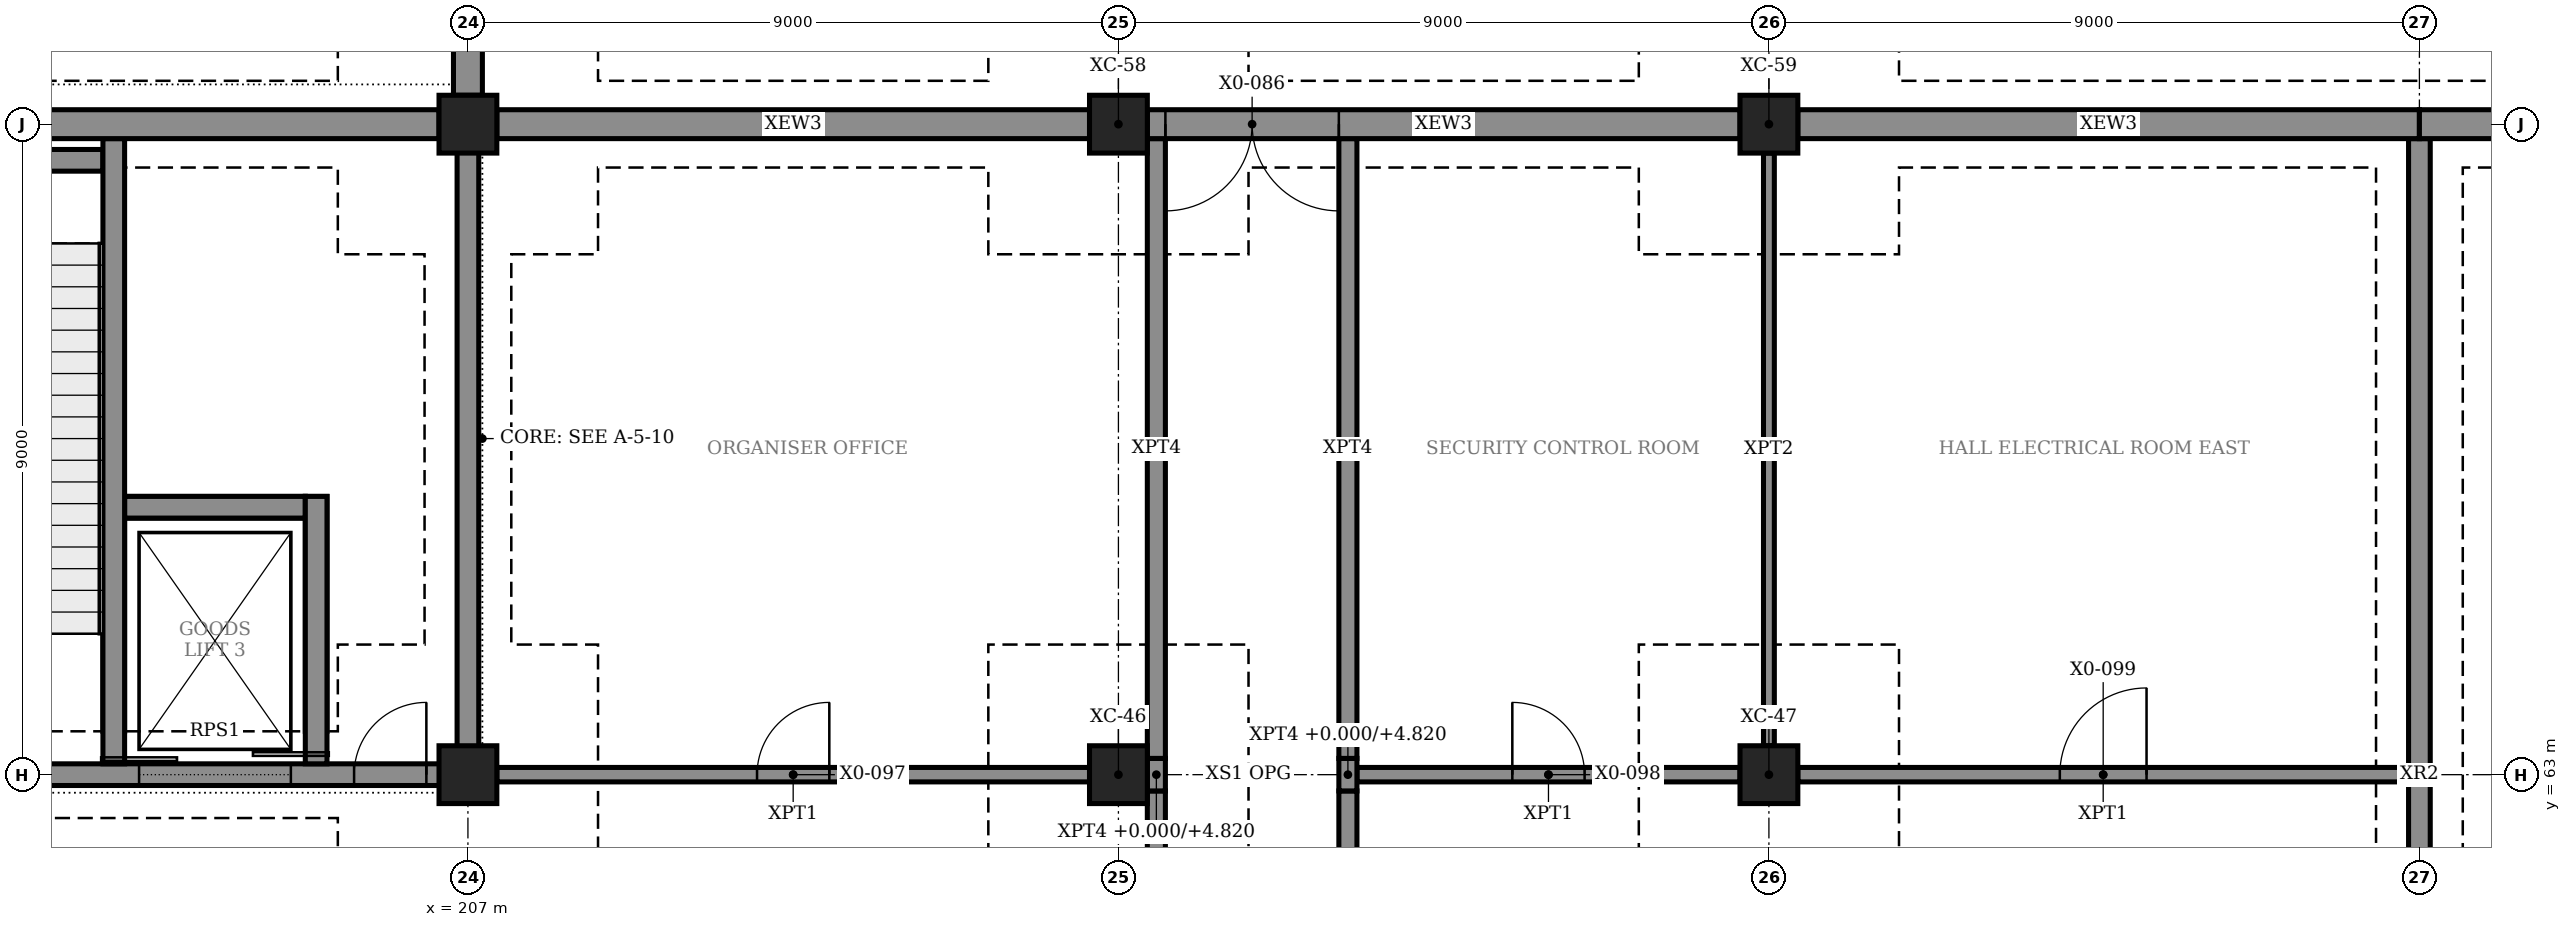
"""IFC4 building model, lengths in metres.
Left out: names, types, materials, properties, quantities, classifications, styles, units other than length and angle.
Written with IfcOpenShell. Run it as: python <this file> out.ifc"""

import sys

from ifc_helpers import new_model, si_unit, direction, frame, frame_2d, origin, origin_2d, place, context, subcontext, project, spatial, rectangle, extrude, element, fill, save


model = new_model("IFC4")
c1 = context("Model", 3, precision=1e-05, world=origin(), true_north=direction((0.0, 1.0)))
c2 = subcontext(c1, "Body", "Model", "MODEL_VIEW")
j1 = project(units=[si_unit("LENGTHUNIT", "METRE"), si_unit("PLANEANGLEUNIT", "RADIAN")], contexts=[c1])
p1 = place(None, origin())
s1 = spatial("IfcSite", under=j1, at=p1, CompositionType="ELEMENT")
p2 = place(p1, origin())
s2 = spatial("IfcBuilding", under=s1, at=p2, CompositionType="ELEMENT")
p3 = place(p2, origin())
s3 = spatial("IfcBuildingStorey", under=s2, at=p3, CompositionType="ELEMENT", Elevation=0.0)
for number, where, z_axis, x_axis in (
    (1, (207.0, 63.0, 0.0), (0.0, 0.0, 1.0), (1.0, 0.0, 0.0)),
    (2, (216.0, 63.0, 0.0), (0.0, 0.0, 1.0), (1.0, 0.0, 0.0)),
    (3, (225.0, 63.0, 0.0), (0.0, 0.0, 1.0), (1.0, 0.0, 0.0)),
    (4, (207.0, 72.0, 0.0), (0.0, 0.0, 1.0), (1.0, 0.0, 0.0)),
    (5, (216.0, 72.0, 0.0), (0.0, 0.0, 1.0), (1.0, 0.0, 0.0)),
    (6, (225.0, 72.0, 0.0), (0.0, 0.0, 1.0), (1.0, 0.0, 0.0)),
):
    element("IfcColumn", number, at=place(p3, frame(where, z_axis=z_axis, x_axis=x_axis)), inside=s3, PredefinedType="COLUMN", context=c2, shape_type="SweptSolid", body=[
        extrude(rectangle(XDim=0.8, YDim=0.8, at=origin_2d()), origin(), (0.0, 0.0, 1.0), 6.0),
    ])
p4 = place(p3, frame((197.85, 63.0, 0.0), z_axis=(0.0, 0.0, 1.0), x_axis=(1.0, 0.0, 0.0)))
e7 = element("IfcWall", 7, at=p4, inside=s3, PredefinedType="SHEAR", context=c2, shape_type="SweptSolid", body=[
    extrude(rectangle(XDim=9.3, YDim=0.3, at=frame_2d((4.65, 0.0))), origin(), (0.0, 0.0, 1.0), 6.0),
])
p5 = place(p4, frame((1.325, 0.0, 0.0)))
e8 = element("IfcOpeningElement", 8, at=p5, cuts=e7, PredefinedType="OPENING", context=c2, shape_type="SweptSolid", body=[
    extrude(rectangle(XDim=1.8, YDim=2.4, at=frame_2d((0.9, 1.2))), frame((0.0, 0.16, 0.0), z_axis=(0.0, -1.0, 0.0), x_axis=(1.0, 0.0, 0.0)), (0.0, 0.0, 1.0), 0.32),
])
p6 = place(p4, frame((4.6, 0.0, 0.0)))
e9 = element("IfcOpeningElement", 9, at=p6, cuts=e7, PredefinedType="OPENING", context=c2, shape_type="SweptSolid", body=[
    extrude(rectangle(XDim=2.1, YDim=2.4, at=frame_2d((1.05, 1.2))), frame((0.0, 0.16, 0.0), z_axis=(0.0, -1.0, 0.0), x_axis=(1.0, 0.0, 0.0)), (0.0, 0.0, 1.0), 0.32),
])
p7 = place(p4, frame((7.575, 0.0, 0.0)))
e10 = element("IfcOpeningElement", 10, at=p7, cuts=e7, PredefinedType="OPENING", context=c2, shape_type="SweptSolid", body=[
    extrude(rectangle(XDim=1.0, YDim=2.4, at=frame_2d((0.5, 1.2))), frame((0.0, 0.16, 0.0), z_axis=(0.0, -1.0, 0.0), x_axis=(1.0, 0.0, 0.0)), (0.0, 0.0, 1.0), 0.32),
])
p8 = place(p3, frame((207.0, 63.15, 0.0), z_axis=(0.0, 0.0, 1.0), x_axis=(0.0, 1.0, 0.0)))
e11 = element("IfcWall", 11, at=p8, inside=s3, PredefinedType="SHEAR", context=c2, shape_type="SweptSolid", body=[
    extrude(rectangle(XDim=8.65, YDim=0.3, at=frame_2d((4.325, 0.0))), origin(), (0.0, 0.0, 1.0), 6.0),
])
p9 = place(p3, frame((234.0, 54.2, 0.0), z_axis=(0.0, 0.0, 1.0), x_axis=(0.0, 1.0, 0.0)))
e12 = element("IfcWall", 12, at=p9, inside=s3, PredefinedType="SOLIDWALL", context=c2, shape_type="SweptSolid", body=[
    extrude(rectangle(XDim=17.6, YDim=0.3, at=frame_2d((8.8, 0.0))), origin(), (0.0, 0.0, 1.0), 5.72),
])
for number, where, z_axis, x_axis in (
    (13, (198.4, 72.0, 0.0), (0.0, 0.0, 1.0), (1.0, 0.0, 0.0)),
    (14, (207.4, 72.0, 0.0), (0.0, 0.0, 1.0), (1.0, 0.0, 0.0)),
):
    element("IfcWall", number, at=place(p3, frame(where, z_axis=z_axis, x_axis=x_axis)), inside=s3, PredefinedType="SOLIDWALL", context=c2, shape_type="SweptSolid", body=[
        extrude(rectangle(XDim=8.2, YDim=0.4, at=frame_2d((4.1, 0.0))), origin(), (0.0, 0.0, 1.0), 4.82),
    ])
p10 = place(p3, frame((216.4, 72.0, 0.0), z_axis=(0.0, 0.0, 1.0), x_axis=(1.0, 0.0, 0.0)))
e15 = element("IfcWall", 15, at=p10, inside=s3, PredefinedType="SOLIDWALL", context=c2, shape_type="SweptSolid", body=[
    extrude(rectangle(XDim=8.2, YDim=0.4, at=frame_2d((4.1, 0.0))), origin(), (0.0, 0.0, 1.0), 4.82),
])
p11 = place(p10, frame((0.25, 0.0, 0.0)))
e16 = element("IfcOpeningElement", 16, at=p11, cuts=e15, PredefinedType="OPENING", context=c2, shape_type="SweptSolid", body=[
    extrude(rectangle(XDim=2.4, YDim=2.4, at=frame_2d((1.2, 1.2))), frame((0.0, 0.21, 0.0), z_axis=(0.0, -1.0, 0.0), x_axis=(1.0, 0.0, 0.0)), (0.0, 0.0, 1.0), 0.42),
])
p12 = place(p3, frame((225.4, 72.0, 0.0), z_axis=(0.0, 0.0, 1.0), x_axis=(1.0, 0.0, 0.0)))
e17 = element("IfcWall", 17, at=p12, inside=s3, PredefinedType="SOLIDWALL", context=c2, shape_type="SweptSolid", body=[
    extrude(rectangle(XDim=8.6, YDim=0.4, at=frame_2d((4.3, 0.0))), origin(), (0.0, 0.0, 1.0), 4.82),
])
p13 = place(p3, frame((234.0, 72.0, 0.0), z_axis=(0.0, 0.0, 1.0), x_axis=(1.0, 0.0, 0.0)))
e18 = element("IfcWall", 18, at=p13, inside=s3, PredefinedType="SOLIDWALL", context=c2, shape_type="SweptSolid", body=[
    extrude(rectangle(XDim=9.0, YDim=0.4, at=frame_2d((4.5, 0.0))), origin(), (0.0, 0.0, 1.0), 5.3),
])
p14 = place(p13, frame((1.9, 0.0, 0.0)))
e19 = element("IfcOpeningElement", 19, at=p14, cuts=e18, PredefinedType="OPENING", context=c2, shape_type="SweptSolid", body=[
    extrude(rectangle(XDim=5.2, YDim=5.2, at=frame_2d((2.6, 2.6))), frame((0.0, 0.21, 0.0), z_axis=(0.0, -1.0, 0.0), x_axis=(1.0, 0.0, 0.0)), (0.0, 0.0, 1.0), 0.42),
])
p15 = place(p3, frame((207.0, 72.4, 0.0), z_axis=(0.0, 0.0, 1.0), x_axis=(0.0, 1.0, 0.0)))
e20 = element("IfcWall", 20, at=p15, inside=s3, PredefinedType="SOLIDWALL", context=c2, shape_type="SweptSolid", body=[
    extrude(rectangle(XDim=8.2, YDim=0.4, at=frame_2d((4.1, 0.0))), origin(), (0.0, 0.0, 1.0), 6.0),
])
p16 = place(p3, frame((198.2, 71.5, 0.0), z_axis=(0.0, 0.0, 1.0), x_axis=(1.0, 0.0, 0.0)))
e21 = element("IfcWall", 21, at=p16, inside=s3, PredefinedType="SHEAR", context=c2, shape_type="SweptSolid", body=[
    extrude(rectangle(XDim=3.75, YDim=0.3, at=frame_2d((1.875, 0.0))), origin(), (0.0, 0.0, 1.0), 2.8),
])
p17 = place(p3, frame((202.1, 63.15, 0.0), z_axis=(0.0, 0.0, 1.0), x_axis=(0.0, 1.0, 0.0)))
e22 = element("IfcWall", 22, at=p17, inside=s3, PredefinedType="SHEAR", context=c2, shape_type="SweptSolid", body=[
    extrude(rectangle(XDim=8.65, YDim=0.3, at=frame_2d((4.325, 0.0))), origin(), (0.0, 0.0, 1.0), 5.72),
])
p18 = place(p3, frame((204.9, 63.15, 0.0), z_axis=(0.0, 0.0, 1.0), x_axis=(0.0, 1.0, 0.0)))
e23 = element("IfcWall", 23, at=p18, inside=s3, PredefinedType="SHEAR", context=c2, shape_type="SweptSolid", body=[
    extrude(rectangle(XDim=3.7, YDim=0.3, at=frame_2d((1.85, 0.0))), origin(), (0.0, 0.0, 1.0), 5.72),
])
p19 = place(p3, frame((202.25, 66.7, 0.0), z_axis=(0.0, 0.0, 1.0), x_axis=(1.0, 0.0, 0.0)))
e24 = element("IfcWall", 24, at=p19, inside=s3, PredefinedType="SHEAR", context=c2, shape_type="SweptSolid", body=[
    extrude(rectangle(XDim=2.5, YDim=0.3, at=frame_2d((1.25, 0.0))), origin(), (0.0, 0.0, 1.0), 5.72),
])
for number, where, z_axis, x_axis in (
    (25, (202.1, 63.6, -1.4), (0.0, 0.0, 1.0), (0.0, 1.0, 0.0)),
    (26, (204.9, 63.6, -1.4), (0.0, 0.0, 1.0), (0.0, 1.0, 0.0)),
):
    element("IfcWall", number, at=place(p3, frame(where, z_axis=z_axis, x_axis=x_axis)), inside=s3, PredefinedType="SHEAR", context=c2, shape_type="SweptSolid", body=[
        extrude(rectangle(XDim=3.25, YDim=0.3, at=frame_2d((1.625, 0.0))), origin(), (0.0, 0.0, 1.0), 1.4),
    ])
p20 = place(p3, frame((202.25, 66.7, -1.4), z_axis=(0.0, 0.0, 1.0), x_axis=(1.0, 0.0, 0.0)))
e27 = element("IfcWall", 27, at=p20, inside=s3, PredefinedType="SHEAR", context=c2, shape_type="SweptSolid", body=[
    extrude(rectangle(XDim=2.5, YDim=0.3, at=frame_2d((1.25, 0.0))), origin(), (0.0, 0.0, 1.0), 1.4),
])
p21 = place(p3, frame((207.4, 63.0, 0.0), z_axis=(0.0, 0.0, 1.0), x_axis=(1.0, 0.0, 0.0)))
e28 = element("IfcWall", 28, at=p21, inside=s3, PredefinedType="PARTITIONING", context=c2, shape_type="SweptSolid", body=[
    extrude(rectangle(XDim=8.2, YDim=0.2, at=frame_2d((4.1, 0.0))), origin(), (0.0, 0.0, 1.0), 4.82),
])
p22 = place(p21, frame((3.6, 0.0, 0.015)))
e29 = element("IfcOpeningElement", 29, at=p22, cuts=e28, PredefinedType="OPENING", context=c2, shape_type="SweptSolid", body=[
    extrude(rectangle(XDim=1.0, YDim=2.4, at=frame_2d((0.5, 1.2))), frame((0.0, 0.11, 0.0), z_axis=(0.0, -1.0, 0.0), x_axis=(1.0, 0.0, 0.0)), (0.0, 0.0, 1.0), 0.22),
])
p23 = place(p3, frame((219.3, 63.0, 0.0), z_axis=(0.0, 0.0, 1.0), x_axis=(1.0, 0.0, 0.0)))
e30 = element("IfcWall", 30, at=p23, inside=s3, PredefinedType="PARTITIONING", context=c2, shape_type="SweptSolid", body=[
    extrude(rectangle(XDim=5.3, YDim=0.2, at=frame_2d((2.65, 0.0))), origin(), (0.0, 0.0, 1.0), 4.82),
])
p24 = place(p23, frame((2.15, 0.0, 0.015)))
e31 = element("IfcOpeningElement", 31, at=p24, cuts=e30, PredefinedType="OPENING", context=c2, shape_type="SweptSolid", body=[
    extrude(rectangle(XDim=1.0, YDim=2.4, at=frame_2d((0.5, 1.2))), frame((0.0, 0.11, 0.0), z_axis=(0.0, -1.0, 0.0), x_axis=(1.0, 0.0, 0.0)), (0.0, 0.0, 1.0), 0.22),
])
p25 = place(p3, frame((225.4, 63.0, 0.0), z_axis=(0.0, 0.0, 1.0), x_axis=(1.0, 0.0, 0.0)))
e32 = element("IfcWall", 32, at=p25, inside=s3, PredefinedType="PARTITIONING", context=c2, shape_type="SweptSolid", body=[
    extrude(rectangle(XDim=8.45, YDim=0.2, at=frame_2d((4.225, 0.0))), origin(), (0.0, 0.0, 1.0), 4.82),
])
p26 = place(p25, frame((3.625, 0.0, 0.015)))
e33 = element("IfcOpeningElement", 33, at=p26, cuts=e32, PredefinedType="OPENING", context=c2, shape_type="SweptSolid", body=[
    extrude(rectangle(XDim=1.2, YDim=2.4, at=frame_2d((0.6, 1.2))), frame((0.0, 0.11, 0.0), z_axis=(0.0, -1.0, 0.0), x_axis=(1.0, 0.0, 0.0)), (0.0, 0.0, 1.0), 0.22),
])
p27 = place(p3, frame((225.0, 63.4, 0.0), z_axis=(0.0, 0.0, 1.0), x_axis=(0.0, 1.0, 0.0)))
e34 = element("IfcWall", 34, at=p27, inside=s3, PredefinedType="PARTITIONING", context=c2, shape_type="SweptSolid", body=[
    extrude(rectangle(XDim=8.2, YDim=0.15, at=frame_2d((4.1, 0.0))), origin(), (0.0, 0.0, 1.0), 4.92),
])
p28 = place(p3, frame((216.525, 54.2, 0.0), z_axis=(0.0, 0.0, 1.0), x_axis=(0.0, 1.0, 0.0)))
e35 = element("IfcWall", 35, at=p28, inside=s3, PredefinedType="PARTITIONING", context=c2, shape_type="SweptSolid", body=[
    extrude(rectangle(XDim=8.575, YDim=0.25, at=frame_2d((4.288, 0.0))), origin(), (0.0, 0.0, 1.0), 5.72),
])
p29 = place(p3, frame((216.525, 62.775, 0.0), z_axis=(0.0, 0.0, 1.0), x_axis=(0.0, 1.0, 0.0)))
e36 = element("IfcWall", 36, at=p29, inside=s3, PredefinedType="PARTITIONING", context=c2, shape_type="SweptSolid", body=[
    extrude(rectangle(XDim=0.45, YDim=0.25, at=frame_2d((0.225, 0.0))), origin(), (0.0, 0.0, 1.0), 4.82),
])
for number, where, z_axis, x_axis in (
    (37, (216.525, 63.225, 0.0), (0.0, 0.0, 1.0), (0.0, 1.0, 0.0)),
    (38, (219.175, 54.2, 0.0), (0.0, 0.0, 1.0), (0.0, 1.0, 0.0)),
):
    element("IfcWall", number, at=place(p3, frame(where, z_axis=z_axis, x_axis=x_axis)), inside=s3, PredefinedType="PARTITIONING", context=c2, shape_type="SweptSolid", body=[
        extrude(rectangle(XDim=8.575, YDim=0.25, at=frame_2d((4.288, 0.0))), origin(), (0.0, 0.0, 1.0), 5.72),
    ])
p30 = place(p3, frame((219.175, 62.775, 0.0), z_axis=(0.0, 0.0, 1.0), x_axis=(0.0, 1.0, 0.0)))
e39 = element("IfcWall", 39, at=p30, inside=s3, PredefinedType="PARTITIONING", context=c2, shape_type="SweptSolid", body=[
    extrude(rectangle(XDim=0.45, YDim=0.25, at=frame_2d((0.225, 0.0))), origin(), (0.0, 0.0, 1.0), 4.82),
])
p31 = place(p3, frame((219.175, 63.225, 0.0), z_axis=(0.0, 0.0, 1.0), x_axis=(0.0, 1.0, 0.0)))
e40 = element("IfcWall", 40, at=p31, inside=s3, PredefinedType="PARTITIONING", context=c2, shape_type="SweptSolid", body=[
    extrude(rectangle(XDim=8.575, YDim=0.25, at=frame_2d((4.288, 0.0))), origin(), (0.0, 0.0, 1.0), 5.72),
])
p32 = place(p11, frame((2.4, 0.0, 0.0), z_axis=(0.0, 0.0, 1.0), x_axis=(-1.0, 0.0, 0.0)))
e41 = element("IfcDoor", 41, at=p32, inside=s3, OperationType="DOUBLE_DOOR_SINGLE_SWING", PredefinedType="DOOR", context=c2, shape_type="SweptSolid", body=[
    extrude(rectangle(XDim=2.4, YDim=2.4, at=frame_2d((1.2, 1.2))), frame((0.0, 0.025, 0.0), z_axis=(0.0, -1.0, 0.0), x_axis=(1.0, 0.0, 0.0)), (0.0, 0.0, 1.0), 0.05),
])
fill(e16, e41)
p33 = place(p22, origin())
e42 = element("IfcDoor", 42, at=p33, inside=s3, OperationType="SINGLE_SWING_RIGHT", PredefinedType="DOOR", context=c2, shape_type="SweptSolid", body=[
    extrude(rectangle(XDim=1.0, YDim=2.4, at=frame_2d((0.5, 1.2))), frame((0.0, 0.025, 0.0), z_axis=(0.0, -1.0, 0.0), x_axis=(1.0, 0.0, 0.0)), (0.0, 0.0, 1.0), 0.05),
])
fill(e29, e42)
p34 = place(p24, origin())
e43 = element("IfcDoor", 43, at=p34, inside=s3, OperationType="SINGLE_SWING_LEFT", PredefinedType="DOOR", context=c2, shape_type="SweptSolid", body=[
    extrude(rectangle(XDim=1.0, YDim=2.4, at=frame_2d((0.5, 1.2))), frame((0.0, 0.025, 0.0), z_axis=(0.0, -1.0, 0.0), x_axis=(1.0, 0.0, 0.0)), (0.0, 0.0, 1.0), 0.05),
])
fill(e31, e43)
p35 = place(p26, origin())
e44 = element("IfcDoor", 44, at=p35, inside=s3, OperationType="SINGLE_SWING_RIGHT", PredefinedType="DOOR", context=c2, shape_type="SweptSolid", body=[
    extrude(rectangle(XDim=1.2, YDim=2.4, at=frame_2d((0.6, 1.2))), frame((0.0, 0.025, 0.0), z_axis=(0.0, -1.0, 0.0), x_axis=(1.0, 0.0, 0.0)), (0.0, 0.0, 1.0), 0.05),
])
fill(e33, e44)
p36 = place(p6, origin())
e45 = element("IfcDoor", 45, at=p36, inside=s3, OperationType="DOUBLE_DOOR_SLIDING", PredefinedType="DOOR", context=c2, shape_type="SweptSolid", body=[
    extrude(rectangle(XDim=2.1, YDim=2.4, at=frame_2d((1.05, 1.2))), frame((0.0, 0.025, 0.0), z_axis=(0.0, -1.0, 0.0), x_axis=(1.0, 0.0, 0.0)), (0.0, 0.0, 1.0), 0.05),
])
fill(e9, e45)
p37 = place(p7, origin())
e46 = element("IfcDoor", 46, at=p37, inside=s3, OperationType="SINGLE_SWING_RIGHT", PredefinedType="DOOR", context=c2, shape_type="SweptSolid", body=[
    extrude(rectangle(XDim=1.0, YDim=2.4, at=frame_2d((0.5, 1.2))), frame((0.0, 0.025, 0.0), z_axis=(0.0, -1.0, 0.0), x_axis=(1.0, 0.0, 0.0)), (0.0, 0.0, 1.0), 0.05),
])
fill(e10, e46)
save(model, sys.argv[1])
